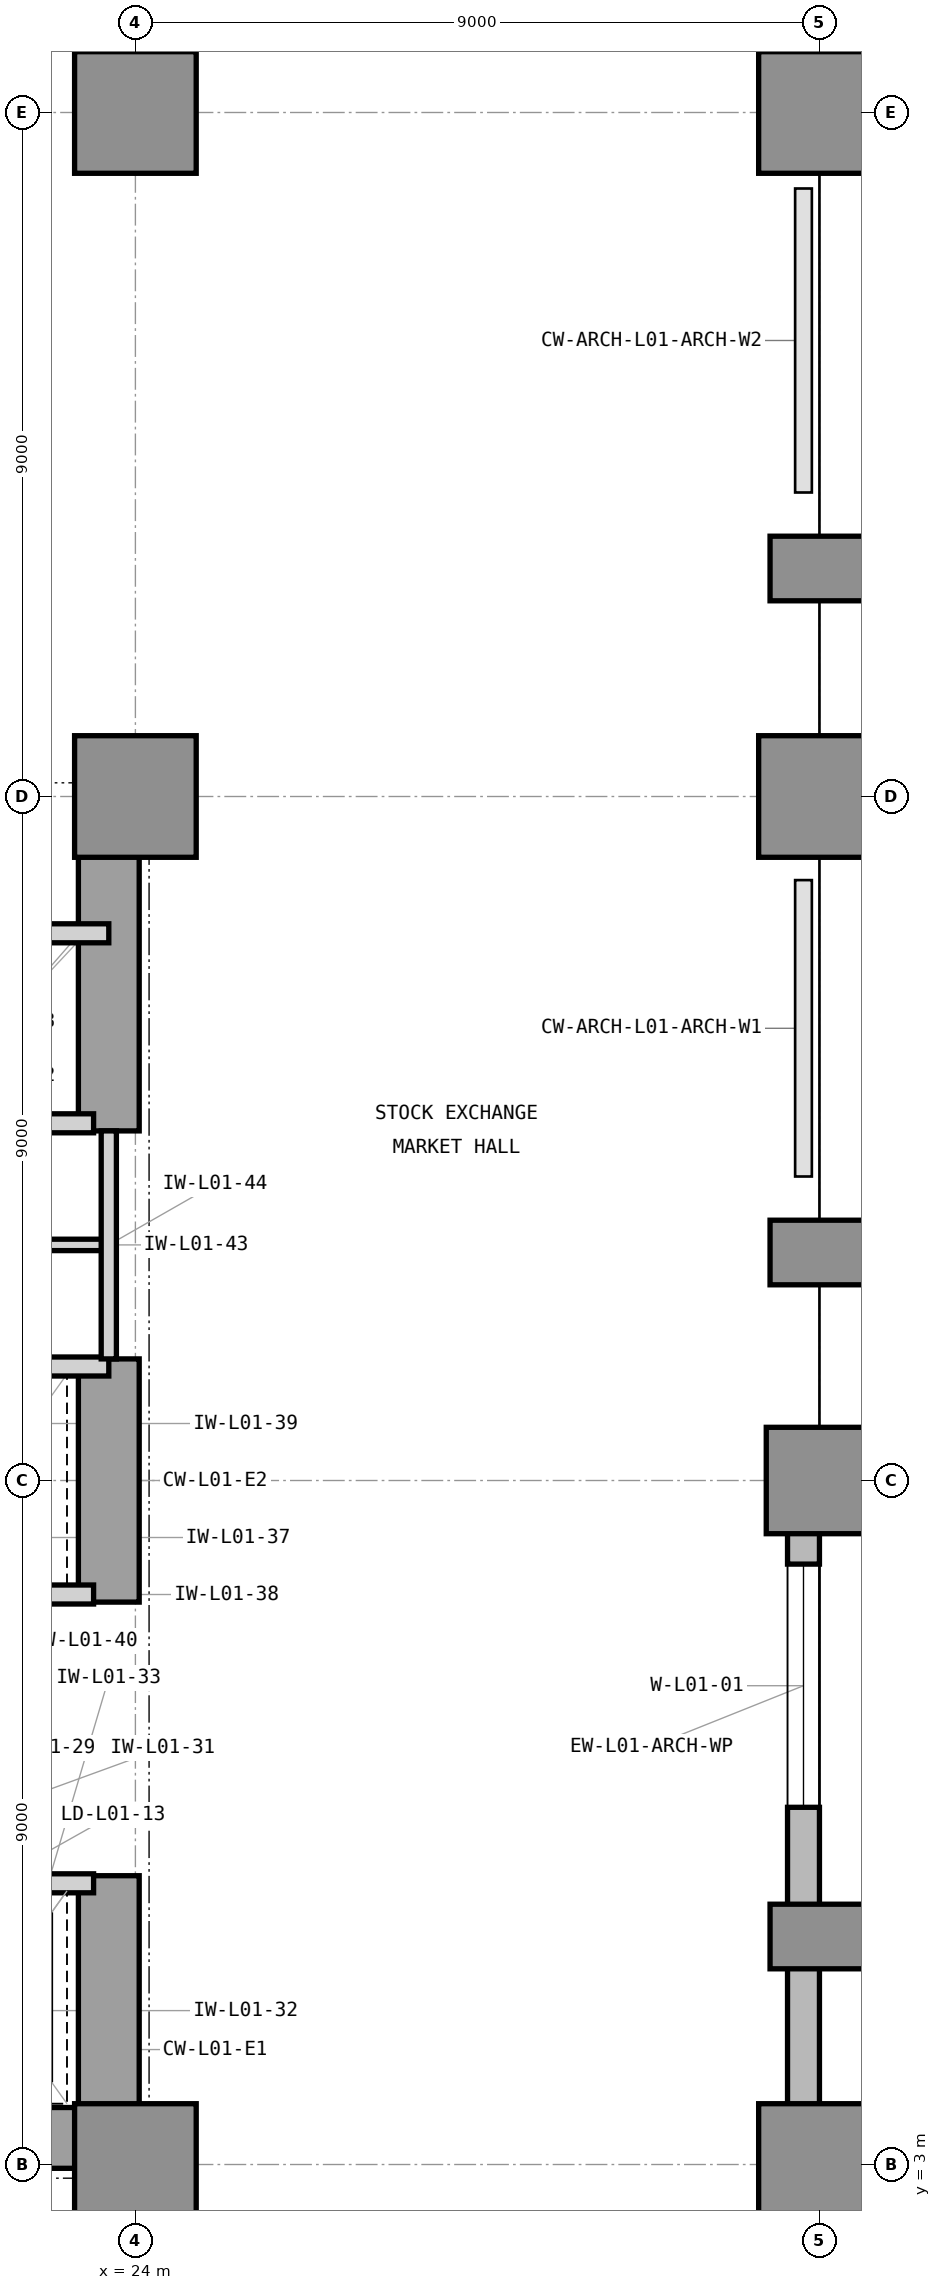
"""IFC4 building model, lengths in metres.
Left out: names, types, materials, properties, quantities, classifications, styles, units other than length and angle.
Written with IfcOpenShell. Run it as: python <this file> out.ifc"""

import sys

from ifc_helpers import new_model, si_unit, direction, frame, frame_2d, origin, origin_2d, place, context, subcontext, project, spatial, rectangle, extrude, element, fill, save


model = new_model("IFC4")
c1 = context("Model", 3, precision=1e-05, world=origin(), true_north=direction((0.0, 1.0)))
c2 = subcontext(c1, "Body", "Model", "MODEL_VIEW")
j1 = project(units=[si_unit("LENGTHUNIT", "METRE"), si_unit("PLANEANGLEUNIT", "RADIAN")], contexts=[c1])
p1 = place(None, origin())
s1 = spatial("IfcSite", under=j1, at=p1, CompositionType="ELEMENT")
p2 = place(p1, origin())
s2 = spatial("IfcBuilding", under=s1, at=p2, CompositionType="ELEMENT")
p3 = place(p2, frame((0.0, 0.0, 5.4)))
s3 = spatial("IfcBuildingStorey", under=s2, at=p3, CompositionType="ELEMENT", Elevation=5.4)
p4 = place(p3, frame((7.475, 3.35, 0.0), z_axis=(0.0, 0.0, 1.0), x_axis=(1.0, 0.0, 0.0)))
e1 = element("IfcWall", 1, at=p4, inside=s3, PredefinedType="SHEAR", context=c2, shape_type="SweptSolid", body=[
    extrude(rectangle(XDim=16.575, YDim=0.8, at=frame_2d((8.288, 0.0))), origin(), (0.0, 0.0, 1.0), 5.4),
])
p5 = place(p3, frame((23.65, 3.75, 0.0), z_axis=(0.0, 0.0, 1.0), x_axis=(0.0, 1.0, 0.0)))
e2 = element("IfcWall", 2, at=p5, inside=s3, PredefinedType="SHEAR", context=c2, shape_type="SweptSolid", body=[
    extrude(rectangle(XDim=3.05, YDim=0.8, at=frame_2d((1.525, 0.0))), origin(), (0.0, 0.0, 1.0), 5.4),
])
p6 = place(p3, frame((23.65, 10.4, 0.0), z_axis=(0.0, 0.0, 1.0), x_axis=(0.0, 1.0, 0.0)))
e3 = element("IfcWall", 3, at=p6, inside=s3, PredefinedType="SHEAR", context=c2, shape_type="SweptSolid", body=[
    extrude(rectangle(XDim=3.2, YDim=0.8, at=frame_2d((1.6, 0.0))), origin(), (0.0, 0.0, 1.0), 5.4),
])
p7 = place(p3, frame((23.65, 16.6, 0.0), z_axis=(0.0, 0.0, 1.0), x_axis=(0.0, 1.0, 0.0)))
e4 = element("IfcWall", 4, at=p7, inside=s3, PredefinedType="SHEAR", context=c2, shape_type="SweptSolid", body=[
    extrude(rectangle(XDim=4.05, YDim=0.8, at=frame_2d((2.025, 0.0))), origin(), (0.0, 0.0, 1.0), 5.4),
])
for number, where, z_axis, x_axis in (
    (5, (24.0, 3.0, 0.0), (0.0, 0.0, 1.0), (1.0, 0.0, 0.0)),
    (6, (24.0, 21.0, 0.0), (0.0, 0.0, 1.0), (1.0, 0.0, 0.0)),
    (7, (24.0, 30.0, 0.0), (0.0, 0.0, 1.0), (1.0, 0.0, 0.0)),
    (8, (33.0, 3.0, 0.0), (0.0, 0.0, 1.0), (1.0, 0.0, 0.0)),
):
    element("IfcColumn", number, at=place(p3, frame(where, z_axis=z_axis, x_axis=x_axis)), inside=s3, PredefinedType="COLUMN", context=c2, shape_type="SweptSolid", body=[
        extrude(rectangle(XDim=1.6, YDim=1.6, at=origin_2d()), origin(), (0.0, 0.0, 1.0), 5.4),
    ])
p8 = place(p3, frame((33.0, 12.0, 0.0), z_axis=(0.0, 0.0, 1.0), x_axis=(1.0, 0.0, 0.0)))
e9 = element("IfcColumn", 9, at=p8, inside=s3, PredefinedType="COLUMN", context=c2, shape_type="SweptSolid", body=[
    extrude(rectangle(XDim=1.4, YDim=1.4, at=origin_2d()), origin(), (0.0, 0.0, 1.0), 5.4),
])
for number, where, z_axis, x_axis in (
    (10, (33.0, 21.0, 0.0), (0.0, 0.0, 1.0), (1.0, 0.0, 0.0)),
    (11, (33.0, 30.0, 0.0), (0.0, 0.0, 1.0), (1.0, 0.0, 0.0)),
):
    element("IfcColumn", number, at=place(p3, frame(where, z_axis=z_axis, x_axis=x_axis)), inside=s3, PredefinedType="COLUMN", context=c2, shape_type="SweptSolid", body=[
        extrude(rectangle(XDim=1.6, YDim=1.6, at=origin_2d()), origin(), (0.0, 0.0, 1.0), 5.4),
    ])
for number, where, z_axis, x_axis in (
    (12, (33.0, 6.0, 0.0), (0.0, 0.0, 1.0), (1.0, 0.0, 0.0)),
    (13, (33.0, 15.0, 0.0), (0.0, 0.0, 1.0), (1.0, 0.0, 0.0)),
    (14, (33.0, 24.0, 0.0), (0.0, 0.0, 1.0), (1.0, 0.0, 0.0)),
):
    element("IfcColumn", number, at=place(p3, frame(where, z_axis=z_axis, x_axis=x_axis)), inside=s3, PredefinedType="PILASTER", context=c2, shape_type="SweptSolid", body=[
        extrude(rectangle(XDim=0.85, YDim=1.3, at=origin_2d()), origin(), (0.0, 0.0, 1.0), 5.4),
    ])
p9 = place(p3, frame((32.79, 12.4, 0.0), z_axis=(0.0, 0.0, 1.0), x_axis=(0.0, -1.0, 0.0)))
e15 = element("IfcWall", 15, at=p9, inside=s3, PredefinedType="STANDARD", context=c2, shape_type="SweptSolid", body=[
    extrude(rectangle(XDim=12.4, YDim=0.42, at=frame_2d((6.2, 0.0))), origin(), (0.0, 0.0, 1.0), 5.1),
])
p10 = place(p9, frame((1.5, 0.0, 0.9)))
e16 = element("IfcOpeningElement", 16, at=p10, cuts=e15, PredefinedType="OPENING", context=c2, shape_type="SweptSolid", body=[
    extrude(rectangle(XDim=3.2, YDim=3.1, at=frame_2d((1.6, 1.55))), frame((0.0, 0.22, 0.0), z_axis=(0.0, -1.0, 0.0), x_axis=(1.0, 0.0, 0.0)), (0.0, 0.0, 1.0), 0.44),
])
p11 = place(p3, frame((33.0, 30.21, 0.0), z_axis=(0.0, 0.0, 1.0), x_axis=(1.0, 0.0, 0.0)))
e17 = element("IfcWall", 17, at=p11, inside=s3, PredefinedType="STANDARD", context=c2, shape_type="SweptSolid", body=[
    extrude(rectangle(XDim=18.0, YDim=0.42, at=frame_2d((9.0, 0.0))), origin(), (0.0, 0.0, 1.0), 5.1),
])
p12 = place(p11, frame((1.05, 0.0, 1.0)))
e18 = element("IfcOpeningElement", 18, at=p12, cuts=e17, PredefinedType="OPENING", context=c2, shape_type="SweptSolid", body=[
    extrude(rectangle(XDim=2.4, YDim=2.9, at=frame_2d((1.2, 1.45))), frame((0.0, 0.22, 0.0), z_axis=(0.0, -1.0, 0.0), x_axis=(1.0, 0.0, 0.0)), (0.0, 0.0, 1.0), 0.44),
])
p13 = place(p3, frame((21.05, 16.7, 0.0), z_axis=(0.0, 0.0, 1.0), x_axis=(1.0, 0.0, 0.0)))
e19 = element("IfcWall", 19, at=p13, inside=s3, PredefinedType="PARTITIONING", context=c2, shape_type="SweptSolid", body=[
    extrude(rectangle(XDim=2.4, YDim=0.25, at=frame_2d((1.2, 0.0))), origin(), (0.0, 0.0, 1.0), 4.473),
])
p14 = place(p3, frame((16.45, 19.2, 0.0), z_axis=(0.0, 0.0, 1.0), x_axis=(1.0, 0.0, 0.0)))
e20 = element("IfcWall", 20, at=p14, inside=s3, PredefinedType="PARTITIONING", context=c2, shape_type="SweptSolid", body=[
    extrude(rectangle(XDim=7.2, YDim=0.25, at=frame_2d((3.6, 0.0))), origin(), (0.0, 0.0, 1.0), 5.09),
])
p15 = place(p3, frame((21.05, 6.7, 0.0), z_axis=(0.0, 0.0, 1.0), x_axis=(1.0, 0.0, 0.0)))
e21 = element("IfcWall", 21, at=p15, inside=s3, PredefinedType="PARTITIONING", context=c2, shape_type="SweptSolid", body=[
    extrude(rectangle(XDim=2.4, YDim=0.25, at=frame_2d((1.2, 0.0))), origin(), (0.0, 0.0, 1.0), 4.473),
])
p16 = place(p15, frame((0.48, 0.0, 0.0)))
e22 = element("IfcOpeningElement", 22, at=p16, cuts=e21, PredefinedType="OPENING", context=c2, shape_type="SweptSolid", body=[
    extrude(rectangle(XDim=1.15, YDim=2.25, at=frame_2d((0.575, 1.125))), frame((0.0, 0.135, 0.0), z_axis=(0.0, -1.0, 0.0), x_axis=(1.0, 0.0, 0.0)), (0.0, 0.0, 1.0), 0.27),
])
p17 = place(p3, frame((21.05, 10.5, 0.0), z_axis=(0.0, 0.0, 1.0), x_axis=(1.0, 0.0, 0.0)))
e23 = element("IfcWall", 23, at=p17, inside=s3, PredefinedType="PARTITIONING", context=c2, shape_type="SweptSolid", body=[
    extrude(rectangle(XDim=2.4, YDim=0.25, at=frame_2d((1.2, 0.0))), origin(), (0.0, 0.0, 1.0), 4.473),
])
p18 = place(p3, frame((14.7, 13.5, 0.0), z_axis=(0.0, 0.0, 1.0), x_axis=(1.0, 0.0, 0.0)))
e24 = element("IfcWall", 24, at=p18, inside=s3, PredefinedType="PARTITIONING", context=c2, shape_type="SweptSolid", body=[
    extrude(rectangle(XDim=8.95, YDim=0.25, at=frame_2d((4.475, 0.0))), origin(), (0.0, 0.0, 1.0), 4.473),
])
p19 = place(p3, frame((18.25, 15.1, 0.0), z_axis=(0.0, 0.0, 1.0), x_axis=(1.0, 0.0, 0.0)))
e25 = element("IfcWall", 25, at=p19, inside=s3, PredefinedType="PARTITIONING", context=c2, shape_type="SweptSolid", body=[
    extrude(rectangle(XDim=5.4, YDim=0.15, at=frame_2d((2.7, 0.0))), origin(), (0.0, 0.0, 1.0), 5.09),
])
p20 = place(p3, frame((23.65, 13.6, 0.0), z_axis=(0.0, 0.0, 1.0), x_axis=(0.0, 1.0, 0.0)))
e26 = element("IfcWall", 26, at=p20, inside=s3, PredefinedType="PARTITIONING", context=c2, shape_type="SweptSolid", body=[
    extrude(rectangle(XDim=3.0, YDim=0.2, at=frame_2d((1.5, 0.0))), origin(), (0.0, 0.0, 1.0), 5.09),
])
p21 = place(p10, origin())
e27 = element("IfcWindow", 27, at=p21, inside=s3, PartitioningType="SINGLE_PANEL", PredefinedType="WINDOW", context=c2, shape_type="SweptSolid", body=[
    extrude(rectangle(XDim=3.2, YDim=3.1, at=frame_2d((1.6, 1.55))), frame((0.0, 0.11, 0.0), z_axis=(0.0, -1.0, 0.0), x_axis=(1.0, 0.0, 0.0)), (0.0, 0.0, 1.0), 0.06),
])
fill(e16, e27)
save(model, sys.argv[1])
